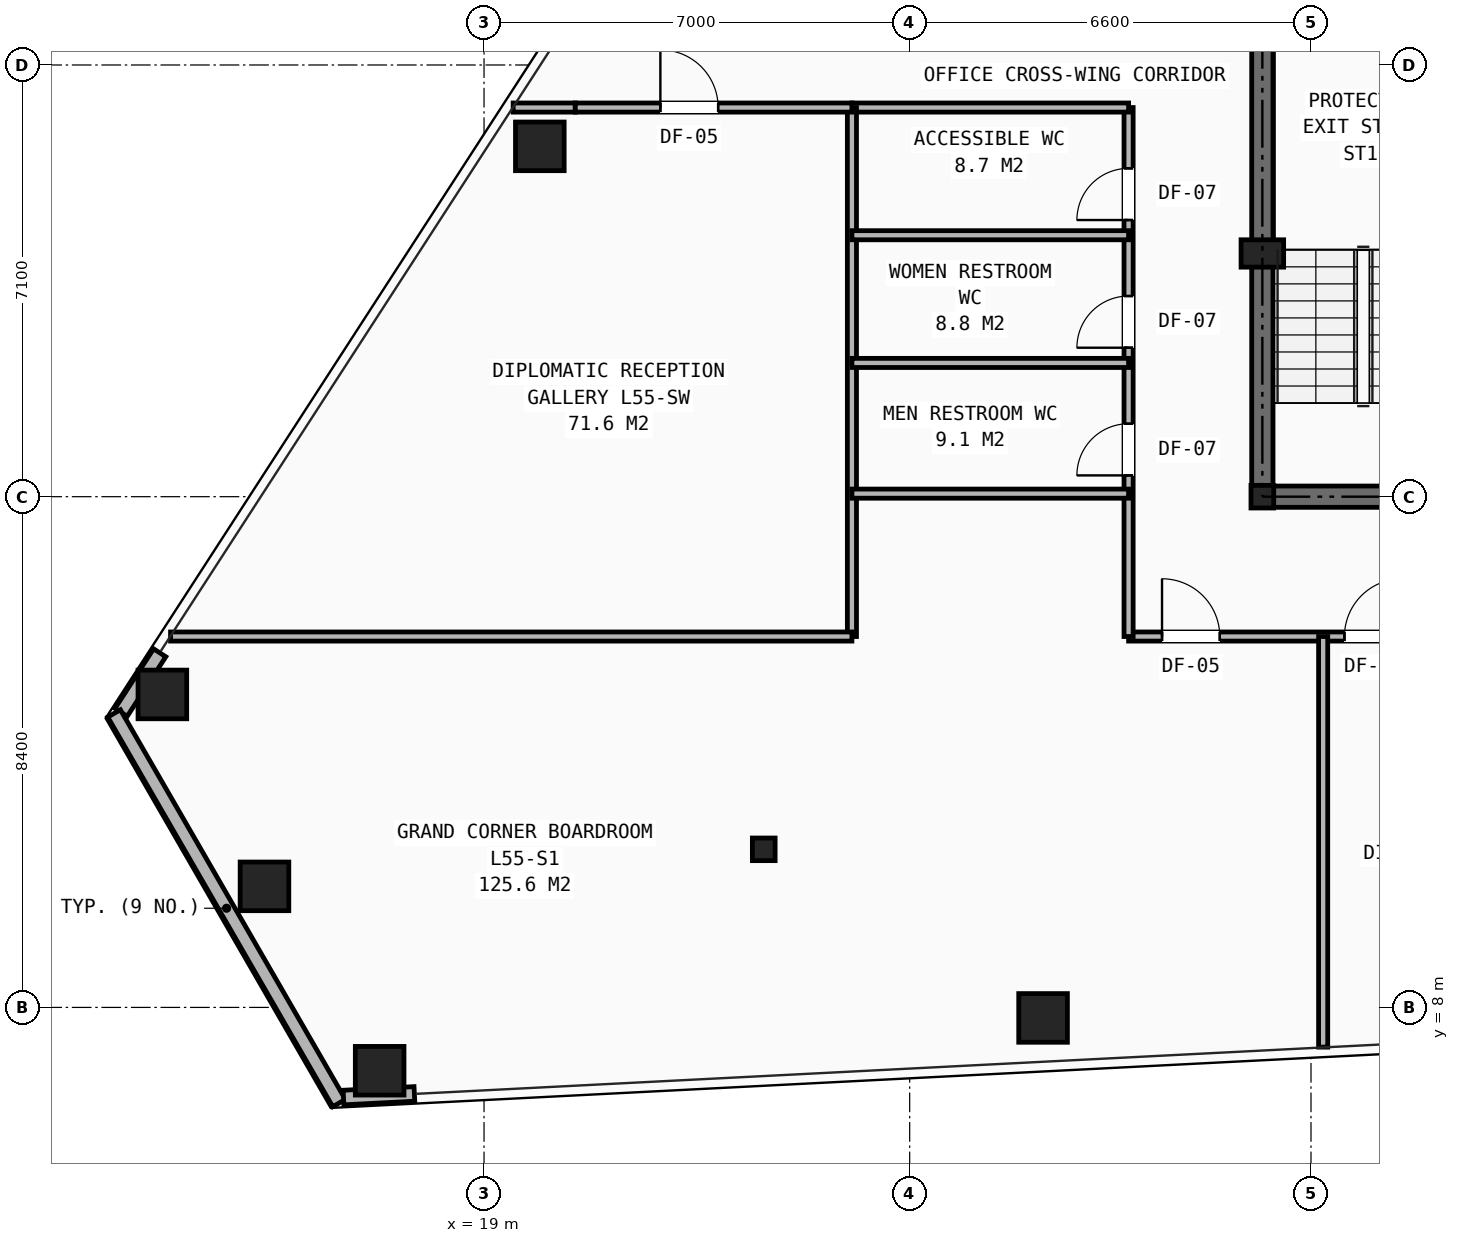
"""IFC4 building model, lengths in metres.
Left out: names, types, materials, properties, quantities, classifications, styles, units other than length and angle.
Written with IfcOpenShell. Run it as: python <this file> out.ifc"""

import sys

from ifc_helpers import new_model, si_unit, direction, frame, frame_2d, origin, origin_2d, place, context, subcontext, project, spatial, rectangle, hollow_rectangle, i_section, extrude, element, fill, save


model = new_model("IFC4")
c1 = context("Model", 3, precision=1e-05, world=origin(), true_north=direction((0.0, 1.0)))
c2 = subcontext(c1, "Body", "Model", "MODEL_VIEW")
j1 = project(units=[si_unit("LENGTHUNIT", "METRE"), si_unit("PLANEANGLEUNIT", "RADIAN")], contexts=[c1])
p1 = place(None, origin())
s1 = spatial("IfcSite", under=j1, at=p1, CompositionType="ELEMENT")
p2 = place(p1, origin())
s2 = spatial("IfcBuilding", under=s1, at=p2, CompositionType="ELEMENT")
p3 = place(p2, frame((0.0, 0.0, 193.05)))
s3 = spatial("IfcBuildingStorey", under=s2, at=p3, CompositionType="ELEMENT", Elevation=193.05)
for number, where, z_axis, x_axis in (
    (1, (31.8, 16.4, 0.0), (0.0, 0.0, 1.0), (1.0, 0.0, 0.0)),
    (2, (23.6, 10.6, 0.0), (0.0, 0.0, 1.0), (1.0, 0.0, 0.0)),
):
    element("IfcColumn", number, at=place(p3, frame(where, z_axis=z_axis, x_axis=x_axis)), inside=s3, PredefinedType="COLUMN", context=c2, shape_type="SweptSolid", body=[
        extrude(i_section(OverallWidth=0.374, OverallDepth=0.372, WebThickness=0.016, FlangeThickness=0.026, at=origin_2d()), origin(), (0.0, 0.0, 1.0), 3.45),
    ])
p4 = place(p3, frame((31.8, 20.4, 0.0), z_axis=(0.0, 0.0, 1.0), x_axis=(1.0, 0.0, 0.0)))
e3 = element("IfcColumn", 3, at=p4, inside=s3, PredefinedType="PILASTER", context=c2, shape_type="SweptSolid", body=[
    extrude(rectangle(XDim=0.7, YDim=0.45, at=origin_2d()), origin(), (0.0, 0.0, 1.0), 3.45),
])
for number, where, z_axis, x_axis in (
    (4, (19.917, 22.162, 0.0), (0.0, 0.0, 1.0), (1.0, 0.0, 0.0)),
    (5, (13.71, 13.147, 0.0), (0.0, 0.0, 1.0), (1.0, 0.0, 0.0)),
    (6, (15.389, 9.991, 0.0), (0.0, 0.0, 1.0), (1.0, 0.0, 0.0)),
    (7, (17.283, 6.958, 0.0), (0.0, 0.0, 1.0), (1.0, 0.0, 0.0)),
    (8, (28.194, 7.827, 0.0), (0.0, 0.0, 1.0), (1.0, 0.0, 0.0)),
):
    element("IfcColumn", number, at=place(p3, frame(where, z_axis=z_axis, x_axis=x_axis)), inside=s3, PredefinedType="COLUMN", context=c2, shape_type="SweptSolid", body=[
        extrude(hollow_rectangle(XDim=0.8, YDim=0.8, WallThickness=0.055, at=origin_2d()), origin(), (0.0, 0.0, 1.0), 3.45),
    ])
p5 = place(p3, frame((13.666, 13.833, 0.0), z_axis=(0.0, 0.0, 1.0), x_axis=(-0.543502707761, -0.839407413987, 0.0)))
e9 = element("IfcWall", 9, at=p5, inside=s3, PredefinedType="SHEAR", context=c2, shape_type="SweptSolid", body=[
    extrude(rectangle(XDim=1.167, YDim=0.24, at=frame_2d((0.584, 0.0))), origin(), (0.0, 0.0, 1.0), 2.403),
])
p6 = place(p3, frame((16.616, 6.427, 0.0), z_axis=(0.0, 0.0, 1.0), x_axis=(-0.499988999718, 0.866031754707, 0.0)))
e10 = element("IfcWall", 10, at=p6, inside=s3, PredefinedType="SHEAR", context=c2, shape_type="SweptSolid", body=[
    extrude(rectangle(XDim=7.4, YDim=0.24, at=frame_2d((3.7, 0.0))), origin(), (0.0, 0.0, 1.0), 2.403),
])
p7 = place(p3, frame((16.689, 6.518, 0.0), z_axis=(0.0, 0.0, 1.0), x_axis=(0.998696973005, 0.051032892443, 0.0)))
e11 = element("IfcWall", 11, at=p7, inside=s3, PredefinedType="SHEAR", context=c2, shape_type="SweptSolid", body=[
    extrude(rectangle(XDim=1.167, YDim=0.24, at=frame_2d((0.583, 0.0))), origin(), (0.0, 0.0, 1.0), 2.403),
])
p8 = place(p3, frame((31.8, 16.4, 0.0), z_axis=(0.0, 0.0, 1.0), x_axis=(1.0, 0.0, 0.0)))
e12 = element("IfcWall", 12, at=p8, inside=s3, PredefinedType="SHEAR", context=c2, shape_type="SweptSolid", body=[
    extrude(rectangle(XDim=16.4, YDim=0.35, at=frame_2d((8.2, 0.0))), origin(), (0.0, 0.0, 1.0), 3.03),
])
p9 = place(p8, frame((7.75, 0.0, 0.0)))
e13 = element("IfcOpeningElement", 13, at=p9, cuts=e12, PredefinedType="OPENING", context=c2, shape_type="SweptSolid", body=[
    extrude(rectangle(XDim=0.9, YDim=2.1, at=frame_2d((0.45, 1.05))), frame((0.0, 0.185, 0.0), z_axis=(0.0, -1.0, 0.0), x_axis=(1.0, 0.0, 0.0)), (0.0, 0.0, 1.0), 0.37),
])
p10 = place(p8, frame((4.2, 0.0, 0.0)))
e14 = element("IfcOpeningElement", 14, at=p10, cuts=e12, PredefinedType="OPENING", context=c2, shape_type="SweptSolid", body=[
    extrude(rectangle(XDim=0.95, YDim=2.1, at=frame_2d((0.475, 1.05))), frame((0.0, 0.185, 0.0), z_axis=(0.0, -1.0, 0.0), x_axis=(1.0, 0.0, 0.0)), (0.0, 0.0, 1.0), 0.37),
])
p11 = place(p8, frame((10.6, 0.0, 0.0)))
e15 = element("IfcOpeningElement", 15, at=p11, cuts=e12, PredefinedType="OPENING", context=c2, shape_type="SweptSolid", body=[
    extrude(rectangle(XDim=0.95, YDim=2.1, at=frame_2d((0.475, 1.05))), frame((0.0, 0.185, 0.0), z_axis=(0.0, -1.0, 0.0), x_axis=(1.0, 0.0, 0.0)), (0.0, 0.0, 1.0), 0.37),
])
p12 = place(p3, frame((31.8, 16.4, 0.0), z_axis=(0.0, 0.0, 1.0), x_axis=(0.0, 1.0, 0.0)))
e16 = element("IfcWall", 16, at=p12, inside=s3, PredefinedType="SHEAR", context=c2, shape_type="SweptSolid", body=[
    extrude(rectangle(XDim=14.8, YDim=0.35, at=frame_2d((7.4, 0.0))), origin(), (0.0, 0.0, 1.0), 3.03),
])
p13 = place(p12, frame((11.0, 0.0, 0.0)))
e17 = element("IfcOpeningElement", 17, at=p13, cuts=e16, PredefinedType="OPENING", context=c2, shape_type="SweptSolid", body=[
    extrude(rectangle(XDim=1.1, YDim=2.15, at=frame_2d((0.55, 1.075))), frame((0.0, 0.185, 0.0), z_axis=(0.0, -1.0, 0.0), x_axis=(1.0, 0.0, 0.0)), (0.0, 0.0, 1.0), 0.37),
])
p14 = place(p3, frame((29.6, 14.1, 0.0), z_axis=(0.0, 0.0, 1.0), x_axis=(1.0, 0.0, 0.0)))
e18 = element("IfcWall", 18, at=p14, inside=s3, PredefinedType="PARTITIONING", context=c2, shape_type="SweptSolid", body=[
    extrude(rectangle(XDim=18.6, YDim=0.15, at=frame_2d((9.3, 0.0))), origin(), (0.0, 0.0, 1.0), 2.161),
])
p15 = place(p14, frame((0.55, 0.0, 0.0)))
e19 = element("IfcOpeningElement", 19, at=p15, cuts=e18, PredefinedType="OPENING", context=c2, shape_type="SweptSolid", body=[
    extrude(rectangle(XDim=0.95, YDim=2.1, at=frame_2d((0.475, 1.05))), frame((0.0, 0.085, 0.0), z_axis=(0.0, -1.0, 0.0), x_axis=(1.0, 0.0, 0.0)), (0.0, 0.0, 1.0), 0.17),
])
p16 = place(p14, frame((3.55, 0.0, 0.0)))
e20 = element("IfcOpeningElement", 20, at=p16, cuts=e18, PredefinedType="OPENING", context=c2, shape_type="SweptSolid", body=[
    extrude(rectangle(XDim=0.95, YDim=2.1, at=frame_2d((0.475, 1.05))), frame((0.0, 0.085, 0.0), z_axis=(0.0, -1.0, 0.0), x_axis=(1.0, 0.0, 0.0)), (0.0, 0.0, 1.0), 0.17),
])
p17 = place(p14, frame((7.55, 0.0, 0.0)))
e21 = element("IfcOpeningElement", 21, at=p17, cuts=e18, PredefinedType="OPENING", context=c2, shape_type="SweptSolid", body=[
    extrude(rectangle(XDim=0.95, YDim=2.1, at=frame_2d((0.475, 1.05))), frame((0.0, 0.085, 0.0), z_axis=(0.0, -1.0, 0.0), x_axis=(1.0, 0.0, 0.0)), (0.0, 0.0, 1.0), 0.17),
])
p18 = place(p14, frame((11.95, 0.0, 0.0)))
e22 = element("IfcOpeningElement", 22, at=p18, cuts=e18, PredefinedType="OPENING", context=c2, shape_type="SweptSolid", body=[
    extrude(rectangle(XDim=0.95, YDim=2.1, at=frame_2d((0.475, 1.05))), frame((0.0, 0.085, 0.0), z_axis=(0.0, -1.0, 0.0), x_axis=(1.0, 0.0, 0.0)), (0.0, 0.0, 1.0), 0.17),
])
p19 = place(p14, frame((16.15, 0.0, 0.0)))
e23 = element("IfcOpeningElement", 23, at=p19, cuts=e18, PredefinedType="OPENING", context=c2, shape_type="SweptSolid", body=[
    extrude(rectangle(XDim=0.95, YDim=2.1, at=frame_2d((0.475, 1.05))), frame((0.0, 0.085, 0.0), z_axis=(0.0, -1.0, 0.0), x_axis=(1.0, 0.0, 0.0)), (0.0, 0.0, 1.0), 0.17),
])
p20 = place(p3, frame((29.6, 14.1, 0.0), z_axis=(0.0, 0.0, 1.0), x_axis=(0.0, 1.0, 0.0)))
e24 = element("IfcWall", 24, at=p20, inside=s3, PredefinedType="PARTITIONING", context=c2, shape_type="SweptSolid", body=[
    extrude(rectangle(XDim=8.7, YDim=0.15, at=frame_2d((4.35, 0.0))), origin(), (0.0, 0.0, 1.0), 3.03),
])
p21 = place(p20, frame((2.65, 0.0, 0.0)))
e25 = element("IfcOpeningElement", 25, at=p21, cuts=e24, PredefinedType="OPENING", context=c2, shape_type="SweptSolid", body=[
    extrude(rectangle(XDim=0.85, YDim=2.05, at=frame_2d((0.425, 1.025))), frame((0.0, 0.085, 0.0), z_axis=(0.0, -1.0, 0.0), x_axis=(1.0, 0.0, 0.0)), (0.0, 0.0, 1.0), 0.17),
])
p22 = place(p20, frame((4.75, 0.0, 0.0)))
e26 = element("IfcOpeningElement", 26, at=p22, cuts=e24, PredefinedType="OPENING", context=c2, shape_type="SweptSolid", body=[
    extrude(rectangle(XDim=0.85, YDim=2.05, at=frame_2d((0.425, 1.025))), frame((0.0, 0.085, 0.0), z_axis=(0.0, -1.0, 0.0), x_axis=(1.0, 0.0, 0.0)), (0.0, 0.0, 1.0), 0.17),
])
p23 = place(p20, frame((6.85, 0.0, 0.0)))
e27 = element("IfcOpeningElement", 27, at=p23, cuts=e24, PredefinedType="OPENING", context=c2, shape_type="SweptSolid", body=[
    extrude(rectangle(XDim=0.85, YDim=2.05, at=frame_2d((0.425, 1.025))), frame((0.0, 0.085, 0.0), z_axis=(0.0, -1.0, 0.0), x_axis=(1.0, 0.0, 0.0)), (0.0, 0.0, 1.0), 0.17),
])
p24 = place(p3, frame((19.479, 22.8, 0.0), z_axis=(0.0, 0.0, 1.0), x_axis=(1.0, 0.0, 0.0)))
e28 = element("IfcWall", 28, at=p24, inside=s3, PredefinedType="PARTITIONING", context=c2, shape_type="SweptSolid", body=[
    extrude(rectangle(XDim=1.021, YDim=0.15, at=frame_2d((0.51, 0.0))), origin(), (0.0, 0.0, 1.0), 2.409),
])
p25 = place(p3, frame((25.05, 22.8, 0.0), z_axis=(0.0, 0.0, 1.0), x_axis=(1.0, 0.0, 0.0)))
e29 = element("IfcWall", 29, at=p25, inside=s3, PredefinedType="PARTITIONING", context=c2, shape_type="SweptSolid", body=[
    extrude(rectangle(XDim=4.55, YDim=0.15, at=frame_2d((2.275, 0.0))), origin(), (0.0, 0.0, 1.0), 2.613),
])
p26 = place(p3, frame((25.05, 14.1, 0.0), z_axis=(0.0, 0.0, 1.0), x_axis=(0.0, 1.0, 0.0)))
e30 = element("IfcWall", 30, at=p26, inside=s3, PredefinedType="PARTITIONING", context=c2, shape_type="SweptSolid", body=[
    extrude(rectangle(XDim=8.7, YDim=0.15, at=frame_2d((4.35, 0.0))), origin(), (0.0, 0.0, 1.0), 2.613),
])
for number, where, z_axis, x_axis in (
    (31, (25.05, 16.45, 0.0), (0.0, 0.0, 1.0), (1.0, 0.0, 0.0)),
    (32, (25.05, 18.6, 0.0), (0.0, 0.0, 1.0), (1.0, 0.0, 0.0)),
    (33, (25.05, 20.7, 0.0), (0.0, 0.0, 1.0), (1.0, 0.0, 0.0)),
):
    element("IfcWall", number, at=place(p3, frame(where, z_axis=z_axis, x_axis=x_axis)), inside=s3, PredefinedType="PARTITIONING", context=c2, shape_type="SweptSolid", body=[
        extrude(rectangle(XDim=4.55, YDim=0.15, at=frame_2d((2.275, 0.0))), origin(), (0.0, 0.0, 1.0), 3.03),
    ])
p27 = place(p3, frame((32.8, 7.347, 0.0), z_axis=(0.0, 0.0, 1.0), x_axis=(0.0, 1.0, 0.0)))
e34 = element("IfcWall", 34, at=p27, inside=s3, PredefinedType="PARTITIONING", context=c2, shape_type="SweptSolid", body=[
    extrude(rectangle(XDim=6.753, YDim=0.15, at=frame_2d((3.376, 0.0))), origin(), (0.0, 0.0, 1.0), 2.409),
])
p28 = place(p3, frame((13.844, 14.1, 0.0), z_axis=(0.0, 0.0, 1.0), x_axis=(1.0, 0.0, 0.0)))
e35 = element("IfcWall", 35, at=p28, inside=s3, PredefinedType="PARTITIONING", context=c2, shape_type="SweptSolid", body=[
    extrude(rectangle(XDim=11.206, YDim=0.15, at=frame_2d((5.603, 0.0))), origin(), (0.0, 0.0, 1.0), 2.241),
])
p29 = place(p3, frame((20.5, 22.8, 0.0), z_axis=(0.0, 0.0, 1.0), x_axis=(1.0, 0.0, 0.0)))
e36 = element("IfcWall", 36, at=p29, inside=s3, PredefinedType="PARTITIONING", context=c2, shape_type="SweptSolid", body=[
    extrude(rectangle(XDim=4.55, YDim=0.15, at=frame_2d((2.275, 0.0))), origin(), (0.0, 0.0, 1.0), 2.409),
])
p30 = place(p29, frame((1.4, 0.0, 0.0)))
e37 = element("IfcOpeningElement", 37, at=p30, cuts=e36, PredefinedType="OPENING", context=c2, shape_type="SweptSolid", body=[
    extrude(rectangle(XDim=0.95, YDim=2.1, at=frame_2d((0.475, 1.05))), frame((0.0, 0.085, 0.0), z_axis=(0.0, -1.0, 0.0), x_axis=(1.0, 0.0, 0.0)), (0.0, 0.0, 1.0), 0.17),
])
p31 = place(p21, origin())
e38 = element("IfcDoor", 38, at=p31, inside=s3, OperationType="SINGLE_SWING_LEFT", PredefinedType="DOOR", context=c2, shape_type="SweptSolid", body=[
    extrude(rectangle(XDim=0.85, YDim=2.05, at=frame_2d((0.425, 1.025))), frame((0.0, 0.025, 0.0), z_axis=(0.0, -1.0, 0.0), x_axis=(1.0, 0.0, 0.0)), (0.0, 0.0, 1.0), 0.05),
])
fill(e25, e38)
p32 = place(p22, origin())
e39 = element("IfcDoor", 39, at=p32, inside=s3, OperationType="SINGLE_SWING_LEFT", PredefinedType="DOOR", context=c2, shape_type="SweptSolid", body=[
    extrude(rectangle(XDim=0.85, YDim=2.05, at=frame_2d((0.425, 1.025))), frame((0.0, 0.025, 0.0), z_axis=(0.0, -1.0, 0.0), x_axis=(1.0, 0.0, 0.0)), (0.0, 0.0, 1.0), 0.05),
])
fill(e26, e39)
p33 = place(p23, origin())
e40 = element("IfcDoor", 40, at=p33, inside=s3, OperationType="SINGLE_SWING_LEFT", PredefinedType="DOOR", context=c2, shape_type="SweptSolid", body=[
    extrude(rectangle(XDim=0.85, YDim=2.05, at=frame_2d((0.425, 1.025))), frame((0.0, 0.025, 0.0), z_axis=(0.0, -1.0, 0.0), x_axis=(1.0, 0.0, 0.0)), (0.0, 0.0, 1.0), 0.05),
])
fill(e27, e40)
p34 = place(p15, origin())
e41 = element("IfcDoor", 41, at=p34, inside=s3, OperationType="SINGLE_SWING_LEFT", PredefinedType="DOOR", context=c2, shape_type="SweptSolid", body=[
    extrude(rectangle(XDim=0.95, YDim=2.1, at=frame_2d((0.475, 1.05))), frame((0.0, 0.025, 0.0), z_axis=(0.0, -1.0, 0.0), x_axis=(1.0, 0.0, 0.0)), (0.0, 0.0, 1.0), 0.05),
])
fill(e19, e41)
p35 = place(p16, origin())
e42 = element("IfcDoor", 42, at=p35, inside=s3, OperationType="SINGLE_SWING_RIGHT", PredefinedType="DOOR", context=c2, shape_type="SweptSolid", body=[
    extrude(rectangle(XDim=0.95, YDim=2.1, at=frame_2d((0.475, 1.05))), frame((0.0, 0.025, 0.0), z_axis=(0.0, -1.0, 0.0), x_axis=(1.0, 0.0, 0.0)), (0.0, 0.0, 1.0), 0.05),
])
fill(e20, e42)
p36 = place(p30, origin())
e43 = element("IfcDoor", 43, at=p36, inside=s3, OperationType="SINGLE_SWING_LEFT", PredefinedType="DOOR", context=c2, shape_type="SweptSolid", body=[
    extrude(rectangle(XDim=0.95, YDim=2.1, at=frame_2d((0.475, 1.05))), frame((0.0, 0.025, 0.0), z_axis=(0.0, -1.0, 0.0), x_axis=(1.0, 0.0, 0.0)), (0.0, 0.0, 1.0), 0.05),
])
fill(e37, e43)
save(model, sys.argv[1])
